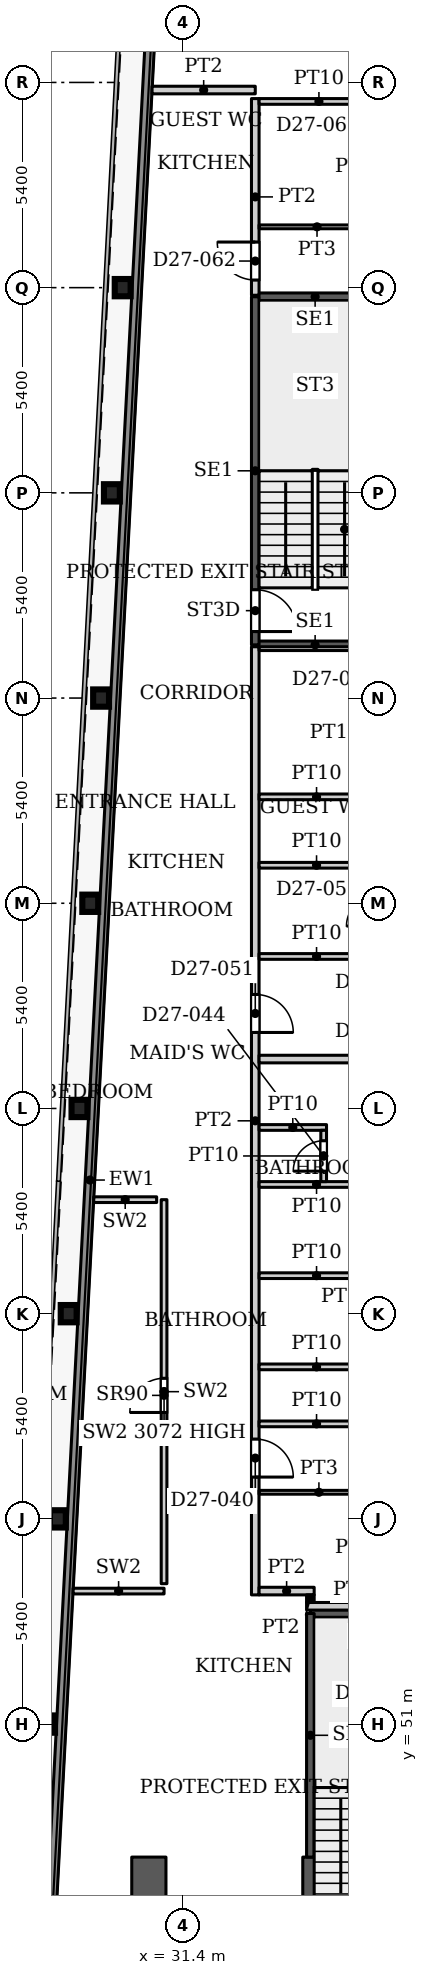
"""IFC4 building model, lengths in metres.
Left out: names, types, materials, properties, quantities, classifications, styles, units other than length and angle.
Written with IfcOpenShell. Run it as: python <this file> out.ifc"""

import sys

from ifc_helpers import new_model, si_unit, direction, frame, frame_2d, origin, origin_2d, place, context, subcontext, project, spatial, rectangle, i_section, extrude, source, transform, mapped, element, fill, save


model = new_model("IFC4")
c1 = context("Model", 3, precision=1e-05, world=origin(), true_north=direction((0.0, 1.0)))
c2 = subcontext(c1, "Body", "Model", "MODEL_VIEW")
j1 = project(units=[si_unit("LENGTHUNIT", "METRE"), si_unit("PLANEANGLEUNIT", "RADIAN")], contexts=[c1])
p1 = place(None, origin())
s1 = spatial("IfcSite", under=j1, at=p1, CompositionType="ELEMENT")
p2 = place(p1, origin())
s2 = spatial("IfcBuilding", under=s1, at=p2, CompositionType="ELEMENT")
p3 = place(p2, frame((0.0, 0.0, 121.4)))
s3 = spatial("IfcBuildingStorey", under=s2, at=p3, CompositionType="ELEMENT", Elevation=121.4)
for number, where, z_axis, x_axis in (
    (1, (27.822, 51.0, 0.0), (0.0, 0.0, 1.0), (1.0, 0.0, 0.0)),
    (2, (28.106, 56.4, 0.0), (0.0, 0.0, 1.0), (1.0, 0.0, 0.0)),
    (3, (28.39, 61.8, 0.0), (0.0, 0.0, 1.0), (1.0, 0.0, 0.0)),
    (4, (28.674, 67.2, 0.0), (0.0, 0.0, 1.0), (1.0, 0.0, 0.0)),
    (5, (28.958, 72.6, 0.0), (0.0, 0.0, 1.0), (1.0, 0.0, 0.0)),
    (6, (29.243, 78.0, 0.0), (0.0, 0.0, 1.0), (1.0, 0.0, 0.0)),
    (7, (29.527, 83.4, 0.0), (0.0, 0.0, 1.0), (1.0, 0.0, 0.0)),
    (8, (29.811, 88.8, 0.0), (0.0, 0.0, 1.0), (1.0, 0.0, 0.0)),
):
    element("IfcColumn", number, at=place(p3, frame(where, z_axis=z_axis, x_axis=x_axis)), inside=s3, PredefinedType="COLUMN", context=c2, shape_type="SweptSolid", body=[
        extrude(i_section(OverallWidth=0.418, OverallDepth=0.455, WebThickness=0.042, FlangeThickness=0.068, FilletRadius=0.014, at=origin_2d()), origin(), (0.0, 0.0, 1.0), 3.9),
    ])
p4 = place(p3, frame((34.75, 29.05, 0.0), z_axis=(0.0, 0.0, 1.0), x_axis=(0.0, 1.0, 0.0)))
e9 = element("IfcWall", 9, at=p4, inside=s3, PredefinedType="SHEAR", context=c2, shape_type="SweptSolid", body=[
    extrude(rectangle(XDim=18.45, YDim=0.4, at=frame_2d((9.225, 0.0))), origin(), (0.0, 0.0, 1.0), 3.9),
])
p5 = place(p4, frame((8.025, 0.0, 0.0)))
e10 = element("IfcOpeningElement", 10, at=p5, cuts=e9, PredefinedType="OPENING", context=c2, shape_type="SweptSolid", body=[
    extrude(rectangle(XDim=1.1, YDim=2.2, at=frame_2d((0.55, 1.1))), frame((0.0, 0.21, 0.0), z_axis=(0.0, -1.0, 0.0), x_axis=(1.0, 0.0, 0.0)), (0.0, 0.0, 1.0), 0.42),
])
p6 = place(p4, frame((10.875, 0.0, 0.0)))
e11 = element("IfcOpeningElement", 11, at=p6, cuts=e9, PredefinedType="OPENING", context=c2, shape_type="SweptSolid", body=[
    extrude(rectangle(XDim=1.1, YDim=2.2, at=frame_2d((0.55, 1.1))), frame((0.0, 0.21, 0.0), z_axis=(0.0, -1.0, 0.0), x_axis=(1.0, 0.0, 0.0)), (0.0, 0.0, 1.0), 0.42),
])
p7 = place(p4, frame((13.725, 0.0, 0.0)))
e12 = element("IfcOpeningElement", 12, at=p7, cuts=e9, PredefinedType="OPENING", context=c2, shape_type="SweptSolid", body=[
    extrude(rectangle(XDim=1.1, YDim=2.2, at=frame_2d((0.55, 1.1))), frame((0.0, 0.21, 0.0), z_axis=(0.0, -1.0, 0.0), x_axis=(1.0, 0.0, 0.0)), (0.0, 0.0, 1.0), 0.42),
])
p8 = place(p4, frame((15.95, 0.0, 0.0)))
e13 = element("IfcOpeningElement", 13, at=p8, cuts=e9, PredefinedType="OPENING", context=c2, shape_type="SweptSolid", body=[
    extrude(rectangle(XDim=1.1, YDim=2.2, at=frame_2d((0.55, 1.1))), frame((0.0, 0.21, 0.0), z_axis=(0.0, -1.0, 0.0), x_axis=(1.0, 0.0, 0.0)), (0.0, 0.0, 1.0), 0.42),
])
p9 = place(p3, frame((30.5, 29.05, 0.0), z_axis=(0.0, 0.0, 1.0), x_axis=(0.0, 1.0, 0.0)))
e14 = element("IfcWall", 14, at=p9, inside=s3, PredefinedType="SHEAR", context=c2, shape_type="SweptSolid", body=[
    extrude(rectangle(XDim=18.45, YDim=0.9, at=frame_2d((9.225, 0.0))), origin(), (0.0, 0.0, 1.0), 3.9),
])
p10 = place(p9, frame((6.55, 0.0, 0.0)))
e15 = element("IfcOpeningElement", 15, at=p10, cuts=e14, PredefinedType="OPENING", context=c2, shape_type="SweptSolid", body=[
    extrude(rectangle(XDim=0.9, YDim=2.2, at=frame_2d((0.45, 1.1))), frame((0.0, 0.46, 0.0), z_axis=(0.0, -1.0, 0.0), x_axis=(1.0, 0.0, 0.0)), (0.0, 0.0, 1.0), 0.92),
])
p11 = place(p9, frame((11.025, 0.0, 0.0)))
e16 = element("IfcOpeningElement", 16, at=p11, cuts=e14, PredefinedType="OPENING", context=c2, shape_type="SweptSolid", body=[
    extrude(rectangle(XDim=0.9, YDim=2.2, at=frame_2d((0.45, 1.1))), frame((0.0, 0.46, 0.0), z_axis=(0.0, -1.0, 0.0), x_axis=(1.0, 0.0, 0.0)), (0.0, 0.0, 1.0), 0.92),
])
p12 = place(p3, frame((27.195, 31.969, 0.0), z_axis=(0.0, 0.0, 1.0), x_axis=(0.052554995867, 0.998618031286, 0.0)))
e17 = element("IfcWall", 17, at=p12, inside=s3, PredefinedType="SOLIDWALL", context=c2, shape_type="SweptSolid", body=[
    extrude(rectangle(XDim=66.787, YDim=0.25, at=frame_2d((33.394, 0.0))), origin(), (0.0, 0.0, 1.0), 3.75),
])
p13 = place(p3, frame((34.75, 53.91, 0.0), z_axis=(0.0, 0.0, 1.0), x_axis=(1.0, 0.0, 0.0)))
e18 = element("IfcWall", 18, at=p13, inside=s3, PredefinedType="SHEAR", context=c2, shape_type="SweptSolid", body=[
    extrude(rectangle(XDim=3.15, YDim=0.2, at=frame_2d((1.575, 0.0))), origin(), (0.0, 0.0, 1.0), 3.9),
])
p14 = place(p3, frame((34.75, 47.5, 0.0), z_axis=(0.0, 0.0, 1.0), x_axis=(0.0, 1.0, 0.0)))
e19 = element("IfcWall", 19, at=p14, inside=s3, PredefinedType="SHEAR", context=c2, shape_type="SweptSolid", body=[
    extrude(rectangle(XDim=6.41, YDim=0.2, at=frame_2d((3.205, 0.0))), origin(), (0.0, 0.0, 1.0), 3.9),
])
for number, where, z_axis, x_axis in (
    (20, (33.3, 79.4, 0.0), (0.0, 0.0, 1.0), (1.0, 0.0, 0.0)),
    (21, (33.3, 88.56, 0.0), (0.0, 0.0, 1.0), (1.0, 0.0, 0.0)),
):
    element("IfcWall", number, at=place(p3, frame(where, z_axis=z_axis, x_axis=x_axis)), inside=s3, PredefinedType="SHEAR", context=c2, shape_type="SweptSolid", body=[
        extrude(rectangle(XDim=3.15, YDim=0.2, at=frame_2d((1.575, 0.0))), origin(), (0.0, 0.0, 1.0), 3.9),
    ])
p15 = place(p3, frame((33.3, 79.4, 0.0), z_axis=(0.0, 0.0, 1.0), x_axis=(0.0, 1.0, 0.0)))
e22 = element("IfcWall", 22, at=p15, inside=s3, PredefinedType="SHEAR", context=c2, shape_type="SweptSolid", body=[
    extrude(rectangle(XDim=9.16, YDim=0.2, at=frame_2d((4.58, 0.0))), origin(), (0.0, 0.0, 1.0), 3.9),
])
p16 = place(p15, frame((0.35, 0.0, 0.0)))
e23 = element("IfcOpeningElement", 23, at=p16, cuts=e22, PredefinedType="OPENING", context=c2, shape_type="SweptSolid", body=[
    extrude(rectangle(XDim=1.1, YDim=2.2, at=frame_2d((0.55, 1.1))), frame((0.0, 0.11, 0.0), z_axis=(0.0, -1.0, 0.0), x_axis=(1.0, 0.0, 0.0)), (0.0, 0.0, 1.0), 0.22),
])
p17 = place(p3, frame((28.508, 54.5, 0.0), z_axis=(0.0, 0.0, 1.0), x_axis=(1.0, 0.0, 0.0)))
e24 = element("IfcWall", 24, at=p17, inside=s3, PredefinedType="PARTITIONING", context=c2, shape_type="SweptSolid", body=[
    extrude(rectangle(XDim=2.392, YDim=0.15, at=frame_2d((1.196, 0.0))), origin(), (0.0, 0.0, 1.0), 3.9),
])
p18 = place(p3, frame((30.9, 54.695, 0.0), z_axis=(0.0, 0.0, 1.0), x_axis=(0.0, 1.0, 0.0)))
e25 = element("IfcWall", 25, at=p18, inside=s3, PredefinedType="PARTITIONING", context=c2, shape_type="SweptSolid", body=[
    extrude(rectangle(XDim=10.105, YDim=0.15, at=frame_2d((5.052, 0.0))), origin(), (0.0, 0.0, 1.0), 3.072),
])
p19 = place(p18, frame((4.505, 0.0, 0.0)))
e26 = element("IfcOpeningElement", 26, at=p19, cuts=e25, PredefinedType="OPENING", context=c2, shape_type="SweptSolid", body=[
    extrude(rectangle(XDim=0.9, YDim=2.2, at=frame_2d((0.45, 1.1))), frame((0.0, 0.085, 0.0), z_axis=(0.0, -1.0, 0.0), x_axis=(1.0, 0.0, 0.0)), (0.0, 0.0, 1.0), 0.17),
])
p20 = place(p3, frame((29.05, 64.8, 0.0), z_axis=(0.0, 0.0, 1.0), x_axis=(1.0, 0.0, 0.0)))
e27 = element("IfcWall", 27, at=p20, inside=s3, PredefinedType="PARTITIONING", context=c2, shape_type="SweptSolid", body=[
    extrude(rectangle(XDim=1.655, YDim=0.15, at=frame_2d((0.828, 0.0))), origin(), (0.0, 0.0, 1.0), 3.9),
])
p21 = place(p3, frame((30.585, 94.0, 0.0), z_axis=(0.0, 0.0, 1.0), x_axis=(1.0, 0.0, 0.0)))
e28 = element("IfcWall", 28, at=p21, inside=s3, PredefinedType="PARTITIONING", context=c2, shape_type="SweptSolid", body=[
    extrude(rectangle(XDim=2.715, YDim=0.2, at=frame_2d((1.358, 0.0))), origin(), (0.0, 0.0, 1.0), 3.6),
])
p22 = place(p3, frame((33.3, 54.4, 0.0), z_axis=(0.0, 0.0, 1.0), x_axis=(0.0, 1.0, 0.0)))
e29 = element("IfcWall", 29, at=p22, inside=s3, PredefinedType="PARTITIONING", context=c2, shape_type="SweptSolid", body=[
    extrude(rectangle(XDim=24.95, YDim=0.2, at=frame_2d((12.475, 0.0))), origin(), (0.0, 0.0, 1.0), 3.6),
])
p23 = place(p22, frame((3.1, 0.0, 0.0)))
e30 = element("IfcOpeningElement", 30, at=p23, cuts=e29, PredefinedType="OPENING", context=c2, shape_type="SweptSolid", body=[
    extrude(rectangle(XDim=1.0, YDim=2.1, at=frame_2d((0.5, 1.05))), frame((0.0, 0.11, 0.0), z_axis=(0.0, -1.0, 0.0), x_axis=(1.0, 0.0, 0.0)), (0.0, 0.0, 1.0), 0.22),
])
p24 = place(p22, frame((14.8, 0.0, 0.0)))
e31 = element("IfcOpeningElement", 31, at=p24, cuts=e29, PredefinedType="OPENING", context=c2, shape_type="SweptSolid", body=[
    extrude(rectangle(XDim=1.0, YDim=2.1, at=frame_2d((0.5, 1.05))), frame((0.0, 0.11, 0.0), z_axis=(0.0, -1.0, 0.0), x_axis=(1.0, 0.0, 0.0)), (0.0, 0.0, 1.0), 0.22),
])
p25 = place(p3, frame((33.3, 88.6, 0.0), z_axis=(0.0, 0.0, 1.0), x_axis=(0.0, 1.0, 0.0)))
e32 = element("IfcWall", 32, at=p25, inside=s3, PredefinedType="PARTITIONING", context=c2, shape_type="SweptSolid", body=[
    extrude(rectangle(XDim=5.175, YDim=0.2, at=frame_2d((2.587, 0.0))), origin(), (0.0, 0.0, 1.0), 3.6),
])
p26 = place(p25, frame((0.4, 0.0, 0.0)))
e33 = element("IfcOpeningElement", 33, at=p26, cuts=e32, PredefinedType="OPENING", context=c2, shape_type="SweptSolid", body=[
    extrude(rectangle(XDim=1.0, YDim=2.1, at=frame_2d((0.5, 1.05))), frame((0.0, 0.11, 0.0), z_axis=(0.0, -1.0, 0.0), x_axis=(1.0, 0.0, 0.0)), (0.0, 0.0, 1.0), 0.22),
])
p27 = place(p3, frame((33.4, 54.5, 0.0), z_axis=(0.0, 0.0, 1.0), x_axis=(1.0, 0.0, 0.0)))
e34 = element("IfcWall", 34, at=p27, inside=s3, PredefinedType="PARTITIONING", context=c2, shape_type="SweptSolid", body=[
    extrude(rectangle(XDim=1.45, YDim=0.2, at=frame_2d((0.725, 0.0))), origin(), (0.0, 0.0, 1.0), 3.6),
])
p28 = place(p3, frame((33.4, 57.1, 0.0), z_axis=(0.0, 0.0, 1.0), x_axis=(1.0, 0.0, 0.0)))
e35 = element("IfcWall", 35, at=p28, inside=s3, PredefinedType="PARTITIONING", context=c2, shape_type="SweptSolid", body=[
    extrude(rectangle(XDim=3.15, YDim=0.1, at=frame_2d((1.575, 0.0))), origin(), (0.0, 0.0, 1.0), 3.6),
])
for number, where, z_axis, x_axis in (
    (36, (33.4, 58.9, 0.0), (0.0, 0.0, 1.0), (1.0, 0.0, 0.0)),
    (37, (33.4, 60.4, 0.0), (0.0, 0.0, 1.0), (1.0, 0.0, 0.0)),
    (38, (33.4, 62.8, 0.0), (0.0, 0.0, 1.0), (1.0, 0.0, 0.0)),
    (39, (33.4, 65.2, 0.0), (0.0, 0.0, 1.0), (1.0, 0.0, 0.0)),
):
    element("IfcWall", number, at=place(p3, frame(where, z_axis=z_axis, x_axis=x_axis)), inside=s3, PredefinedType="PARTITIONING", context=c2, shape_type="SweptSolid", body=[
        extrude(rectangle(XDim=3.025, YDim=0.15, at=frame_2d((1.513, 0.0))), origin(), (0.0, 0.0, 1.0), 3.6),
    ])
p29 = place(p3, frame((33.4, 66.7, 0.0), z_axis=(0.0, 0.0, 1.0), x_axis=(1.0, 0.0, 0.0)))
e40 = element("IfcWall", 40, at=p29, inside=s3, PredefinedType="PARTITIONING", context=c2, shape_type="SweptSolid", body=[
    extrude(rectangle(XDim=1.775, YDim=0.15, at=frame_2d((0.888, 0.0))), origin(), (0.0, 0.0, 1.0), 3.6),
])
p30 = place(p3, frame((33.4, 68.5, 0.0), z_axis=(0.0, 0.0, 1.0), x_axis=(1.0, 0.0, 0.0)))
e41 = element("IfcWall", 41, at=p30, inside=s3, PredefinedType="PARTITIONING", context=c2, shape_type="SweptSolid", body=[
    extrude(rectangle(XDim=12.5, YDim=0.2, at=frame_2d((6.25, 0.0))), origin(), (0.0, 0.0, 1.0), 3.6),
])
for number, where, z_axis, x_axis in (
    (42, (33.4, 71.2, 0.0), (0.0, 0.0, 1.0), (1.0, 0.0, 0.0)),
    (43, (33.4, 73.6, 0.0), (0.0, 0.0, 1.0), (1.0, 0.0, 0.0)),
    (44, (33.4, 75.4, 0.0), (0.0, 0.0, 1.0), (1.0, 0.0, 0.0)),
):
    element("IfcWall", number, at=place(p3, frame(where, z_axis=z_axis, x_axis=x_axis)), inside=s3, PredefinedType="PARTITIONING", context=c2, shape_type="SweptSolid", body=[
        extrude(rectangle(XDim=3.025, YDim=0.15, at=frame_2d((1.513, 0.0))), origin(), (0.0, 0.0, 1.0), 3.6),
    ])
p31 = place(p3, frame((33.4, 79.3, 0.0), z_axis=(0.0, 0.0, 1.0), x_axis=(1.0, 0.0, 0.0)))
e45 = element("IfcWall", 45, at=p31, inside=s3, PredefinedType="PARTITIONING", context=c2, shape_type="SweptSolid", body=[
    extrude(rectangle(XDim=12.5, YDim=0.1, at=frame_2d((6.25, 0.0))), origin(), (0.0, 0.0, 1.0), 3.6),
])
p32 = place(p31, frame((3.355, 0.0, 0.0)))
e46 = element("IfcOpeningElement", 46, at=p32, cuts=e45, PredefinedType="OPENING", context=c2, shape_type="SweptSolid", body=[
    extrude(rectangle(XDim=0.9, YDim=2.1, at=frame_2d((0.45, 1.05))), frame((0.0, 0.06, 0.0), z_axis=(0.0, -1.0, 0.0), x_axis=(1.0, 0.0, 0.0)), (0.0, 0.0, 1.0), 0.12),
])
p33 = place(p3, frame((33.4, 90.4, 0.0), z_axis=(0.0, 0.0, 1.0), x_axis=(1.0, 0.0, 0.0)))
e47 = element("IfcWall", 47, at=p33, inside=s3, PredefinedType="PARTITIONING", context=c2, shape_type="SweptSolid", body=[
    extrude(rectangle(XDim=3.05, YDim=0.1, at=frame_2d((1.525, 0.0))), origin(), (0.0, 0.0, 1.0), 3.6),
])
p34 = place(p3, frame((33.4, 93.7, 0.0), z_axis=(0.0, 0.0, 1.0), x_axis=(1.0, 0.0, 0.0)))
e48 = element("IfcWall", 48, at=p34, inside=s3, PredefinedType="PARTITIONING", context=c2, shape_type="SweptSolid", body=[
    extrude(rectangle(XDim=3.15, YDim=0.15, at=frame_2d((1.575, 0.0))), origin(), (0.0, 0.0, 1.0), 3.6),
])
p35 = place(p3, frame((34.65, 54.1, 0.0), z_axis=(0.0, 0.0, 1.0), x_axis=(1.0, 0.0, 0.0)))
e49 = element("IfcWall", 49, at=p35, inside=s3, PredefinedType="PARTITIONING", context=c2, shape_type="SweptSolid", body=[
    extrude(rectangle(XDim=3.25, YDim=0.2, at=frame_2d((1.625, 0.0))), origin(), (0.0, 0.0, 1.0), 3.6),
])
p36 = place(p3, frame((34.75, 54.2, 0.0), z_axis=(0.0, 0.0, 1.0), x_axis=(0.0, 1.0, 0.0)))
e50 = element("IfcWall", 50, at=p36, inside=s3, PredefinedType="PARTITIONING", context=c2, shape_type="SweptSolid", body=[
    extrude(rectangle(XDim=0.2, YDim=0.2, at=frame_2d((0.1, 0.0))), origin(), (0.0, 0.0, 1.0), 3.6),
])
p37 = place(p3, frame((35.1, 65.275, 0.0), z_axis=(0.0, 0.0, 1.0), x_axis=(0.0, 1.0, 0.0)))
e51 = element("IfcWall", 51, at=p37, inside=s3, PredefinedType="PARTITIONING", context=c2, shape_type="SweptSolid", body=[
    extrude(rectangle(XDim=1.35, YDim=0.15, at=frame_2d((0.675, 0.0))), origin(), (0.0, 0.0, 1.0), 3.6),
])
p38 = place(p37, frame((0.275, 0.0, 0.0)))
e52 = element("IfcOpeningElement", 52, at=p38, cuts=e51, PredefinedType="OPENING", context=c2, shape_type="SweptSolid", body=[
    extrude(rectangle(XDim=0.8, YDim=2.1, at=frame_2d((0.4, 1.05))), frame((0.0, 0.085, 0.0), z_axis=(0.0, -1.0, 0.0), x_axis=(1.0, 0.0, 0.0)), (0.0, 0.0, 1.0), 0.17),
])
m1 = source(origin(), c2, "Body", "SweptSolid", [
    extrude(rectangle(XDim=0.9, YDim=2.2, at=frame_2d((0.45, 1.1))), frame((0.0, 0.025, 0.0), z_axis=(0.0, -1.0, 0.0), x_axis=(1.0, 0.0, 0.0)), (0.0, 0.0, 1.0), 0.05),
])
p39 = place(p19, origin())
e53 = element("IfcDoor", 53, at=p39, inside=s3, OperationType="SINGLE_SWING_LEFT", PredefinedType="DOOR", context=c2, shape_type="MappedRepresentation", body=[
    mapped(m1, transform((0.0, 0.0, 0.0), x_axis=(1.0, 0.0, 0.0), y_axis=(0.0, 1.0, 0.0), z_axis=(0.0, 0.0, 1.0), scale=1.0)),
])
fill(e26, e53)
m2 = source(origin(), c2, "Body", "SweptSolid", [
    extrude(rectangle(XDim=1.1, YDim=2.2, at=frame_2d((0.55, 1.1))), frame((0.0, 0.025, 0.0), z_axis=(0.0, -1.0, 0.0), x_axis=(1.0, 0.0, 0.0)), (0.0, 0.0, 1.0), 0.05),
])
p40 = place(p16, origin())
e54 = element("IfcDoor", 54, at=p40, inside=s3, OperationType="SINGLE_SWING_RIGHT", PredefinedType="DOOR", context=c2, shape_type="MappedRepresentation", body=[
    mapped(m2, transform((0.0, 0.0, 0.0), x_axis=(1.0, 0.0, 0.0), y_axis=(0.0, 1.0, 0.0), z_axis=(0.0, 0.0, 1.0), scale=1.0)),
])
fill(e23, e54)
m3 = source(origin(), c2, "Body", "SweptSolid", [
    extrude(rectangle(XDim=1.0, YDim=2.1, at=frame_2d((0.5, 1.05))), frame((0.0, 0.025, 0.0), z_axis=(0.0, -1.0, 0.0), x_axis=(1.0, 0.0, 0.0)), (0.0, 0.0, 1.0), 0.05),
])
p41 = place(p23, origin())
e55 = element("IfcDoor", 55, at=p41, inside=s3, OperationType="SINGLE_SWING_RIGHT", PredefinedType="DOOR", context=c2, shape_type="MappedRepresentation", body=[
    mapped(m3, transform((0.0, 0.0, 0.0), x_axis=(1.0, 0.0, 0.0), y_axis=(0.0, 1.0, 0.0), z_axis=(0.0, 0.0, 1.0), scale=1.0)),
])
fill(e30, e55)
m4 = source(origin(), c2, "Body", "SweptSolid", [
    extrude(rectangle(XDim=0.8, YDim=2.1, at=frame_2d((0.4, 1.05))), frame((0.0, 0.025, 0.0), z_axis=(0.0, -1.0, 0.0), x_axis=(1.0, 0.0, 0.0)), (0.0, 0.0, 1.0), 0.05),
])
p42 = place(p38, origin())
e56 = element("IfcDoor", 56, at=p42, inside=s3, OperationType="SINGLE_SWING_LEFT", PredefinedType="DOOR", context=c2, shape_type="MappedRepresentation", body=[
    mapped(m4, transform((0.0, 0.0, 0.0), x_axis=(1.0, 0.0, 0.0), y_axis=(0.0, 1.0, 0.0), z_axis=(0.0, 0.0, 1.0), scale=1.0)),
])
fill(e52, e56)
p43 = place(p24, origin())
e57 = element("IfcDoor", 57, at=p43, inside=s3, OperationType="SINGLE_SWING_RIGHT", PredefinedType="DOOR", context=c2, shape_type="MappedRepresentation", body=[
    mapped(m3, transform((0.0, 0.0, 0.0), x_axis=(1.0, 0.0, 0.0), y_axis=(0.0, 1.0, 0.0), z_axis=(0.0, 0.0, 1.0), scale=1.0)),
])
fill(e31, e57)
p44 = place(p26, origin())
e58 = element("IfcDoor", 58, at=p44, inside=s3, OperationType="SINGLE_SWING_LEFT", PredefinedType="DOOR", context=c2, shape_type="MappedRepresentation", body=[
    mapped(m3, transform((0.0, 0.0, 0.0), x_axis=(1.0, 0.0, 0.0), y_axis=(0.0, 1.0, 0.0), z_axis=(0.0, 0.0, 1.0), scale=1.0)),
])
fill(e33, e58)
save(model, sys.argv[1])
